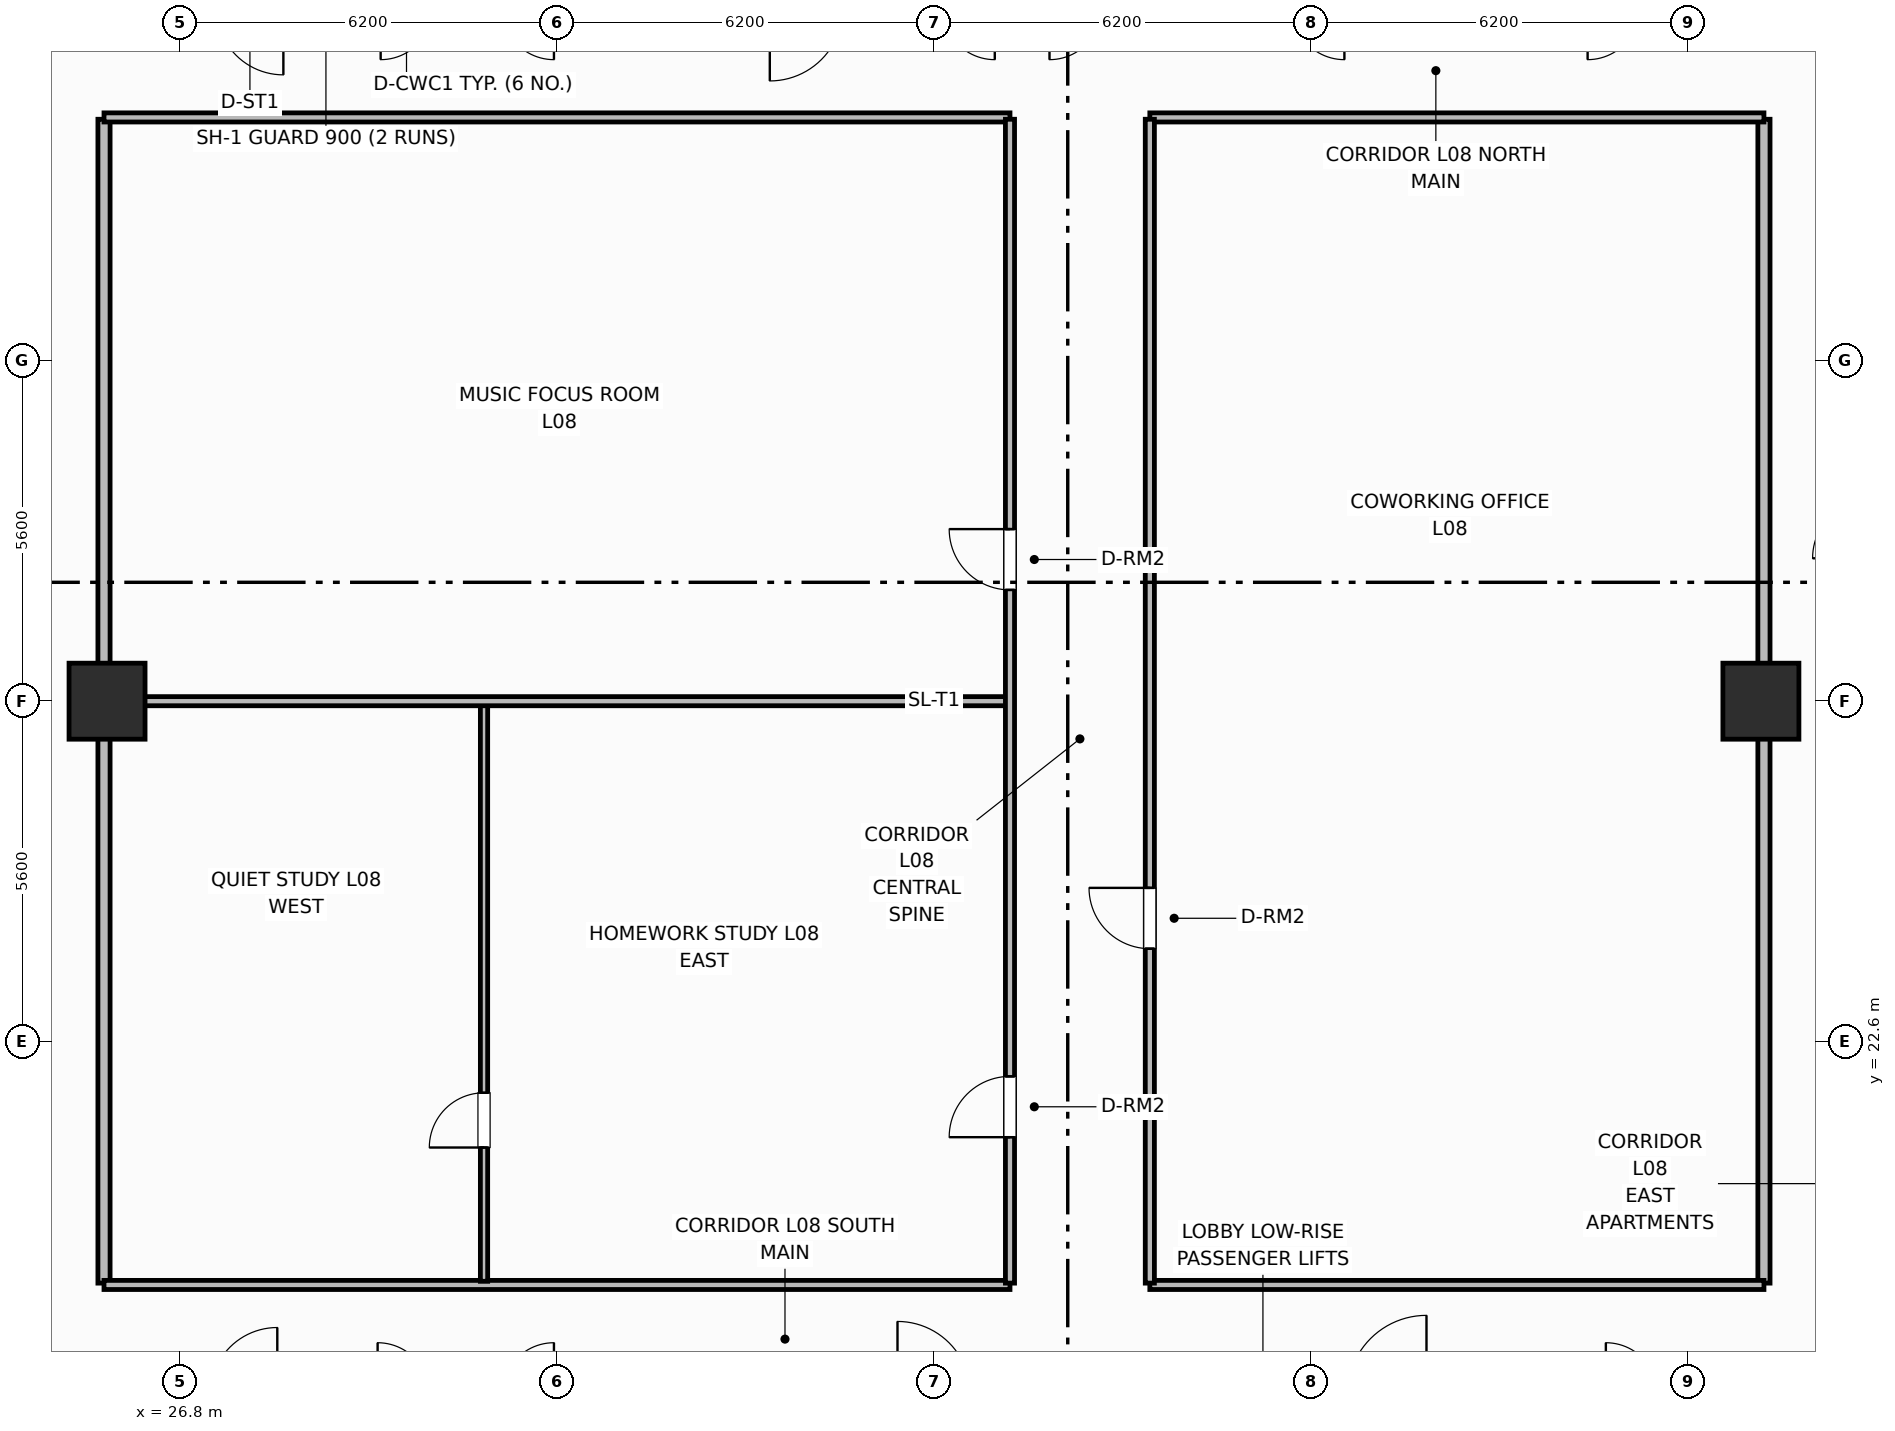
"""IFC4 building model, lengths in metres.
Left out: names, types, materials, properties, quantities, classifications, styles, units other than length and angle.
Written with IfcOpenShell. Run it as: python <this file> out.ifc"""

import sys

from ifc_helpers import new_model, si_unit, direction, frame, frame_2d, origin, origin_2d, place, context, subcontext, project, spatial, rectangle, extrude, element, fill, save


model = new_model("IFC4")
c1 = context("Model", 3, precision=1e-05, world=origin(), true_north=direction((0.0, 1.0)))
c2 = subcontext(c1, "Body", "Model", "MODEL_VIEW")
j1 = project(units=[si_unit("LENGTHUNIT", "METRE"), si_unit("PLANEANGLEUNIT", "RADIAN")], contexts=[c1])
p1 = place(None, origin())
s1 = spatial("IfcSite", under=j1, at=p1, CompositionType="ELEMENT")
p2 = place(p1, origin())
s2 = spatial("IfcBuilding", under=s1, at=p2, CompositionType="ELEMENT")
p3 = place(p2, frame((0.0, 0.0, 36.2)))
s3 = spatial("IfcBuildingStorey", under=s2, at=p3, CompositionType="ELEMENT", Elevation=36.2)
for number, where, z_axis, x_axis in (
    (1, (25.6, 28.2, 0.0), (0.0, 0.0, 1.0), (1.0, 0.0, 0.0)),
    (2, (52.8, 28.2, 0.0), (0.0, 0.0, 1.0), (1.0, 0.0, 0.0)),
):
    element("IfcColumn", number, at=place(p3, frame(where, z_axis=z_axis, x_axis=x_axis)), inside=s3, PredefinedType="COLUMN", context=c2, shape_type="SweptSolid", body=[
        extrude(rectangle(XDim=1.25, YDim=1.25, at=origin_2d()), origin(), (0.0, 0.0, 1.0), 3.7),
    ])
for number, where, z_axis, x_axis in (
    (3, (25.55, 18.63, 0.0), (0.0, 0.0, 1.0), (0.0, 1.0, 0.0)),
    (4, (52.85, 18.63, 0.0), (0.0, 0.0, 1.0), (0.0, 1.0, 0.0)),
):
    element("IfcWall", number, at=place(p3, frame(where, z_axis=z_axis, x_axis=x_axis)), inside=s3, PredefinedType="PARTITIONING", context=c2, shape_type="SweptSolid", body=[
        extrude(rectangle(XDim=19.14, YDim=0.2, at=frame_2d((9.57, 0.0))), origin(), (0.0, 0.0, 1.0), 2.53),
    ])
p4 = place(p3, frame((25.55, 18.6, 0.0), z_axis=(0.0, 0.0, 1.0), x_axis=(1.0, 0.0, 0.0)))
e5 = element("IfcWall", 5, at=p4, inside=s3, PredefinedType="PARTITIONING", context=c2, shape_type="SweptSolid", body=[
    extrude(rectangle(XDim=14.9, YDim=0.15, at=frame_2d((7.45, 0.0))), origin(), (0.0, 0.0, 1.0), 2.53),
])
p5 = place(p3, frame((42.75, 18.6, 0.0), z_axis=(0.0, 0.0, 1.0), x_axis=(1.0, 0.0, 0.0)))
e6 = element("IfcWall", 6, at=p5, inside=s3, PredefinedType="PARTITIONING", context=c2, shape_type="SweptSolid", body=[
    extrude(rectangle(XDim=10.1, YDim=0.15, at=frame_2d((5.05, 0.0))), origin(), (0.0, 0.0, 1.0), 2.53),
])
p6 = place(p3, frame((25.55, 37.8, 0.0), z_axis=(0.0, 0.0, 1.0), x_axis=(1.0, 0.0, 0.0)))
e7 = element("IfcWall", 7, at=p6, inside=s3, PredefinedType="PARTITIONING", context=c2, shape_type="SweptSolid", body=[
    extrude(rectangle(XDim=14.9, YDim=0.15, at=frame_2d((7.45, 0.0))), origin(), (0.0, 0.0, 1.0), 2.53),
])
p7 = place(p3, frame((42.75, 37.8, 0.0), z_axis=(0.0, 0.0, 1.0), x_axis=(1.0, 0.0, 0.0)))
e8 = element("IfcWall", 8, at=p7, inside=s3, PredefinedType="PARTITIONING", context=c2, shape_type="SweptSolid", body=[
    extrude(rectangle(XDim=10.1, YDim=0.15, at=frame_2d((5.05, 0.0))), origin(), (0.0, 0.0, 1.0), 2.53),
])
p8 = place(p3, frame((31.8, 18.66, 0.0), z_axis=(0.0, 0.0, 1.0), x_axis=(0.0, 1.0, 0.0)))
e9 = element("IfcWall", 9, at=p8, inside=s3, PredefinedType="PARTITIONING", context=c2, shape_type="SweptSolid", body=[
    extrude(rectangle(XDim=9.49, YDim=0.12, at=frame_2d((4.745, 0.0))), origin(), (0.0, 0.0, 1.0), 2.53),
])
p9 = place(p8, frame((2.2, 0.0, 0.0)))
e10 = element("IfcOpeningElement", 10, at=p9, cuts=e9, PredefinedType="OPENING", context=c2, shape_type="SweptSolid", body=[
    extrude(rectangle(XDim=0.9, YDim=2.1, at=frame_2d((0.45, 1.05))), frame((0.0, 0.07, 0.0), z_axis=(0.0, -1.0, 0.0), x_axis=(1.0, 0.0, 0.0)), (0.0, 0.0, 1.0), 0.14),
])
p10 = place(p3, frame((25.6, 28.2, 0.0), z_axis=(0.0, 0.0, 1.0), x_axis=(1.0, 0.0, 0.0)))
e11 = element("IfcWall", 11, at=p10, inside=s3, PredefinedType="PARTITIONING", context=c2, shape_type="SweptSolid", body=[
    extrude(rectangle(XDim=14.87, YDim=0.15, at=frame_2d((7.435, 0.0))), origin(), (0.0, 0.0, 1.0), 2.53),
])
p11 = place(p3, frame((40.45, 18.63, 0.0), z_axis=(0.0, 0.0, 1.0), x_axis=(0.0, 1.0, 0.0)))
e12 = element("IfcWall", 12, at=p11, inside=s3, PredefinedType="PARTITIONING", context=c2, shape_type="SweptSolid", body=[
    extrude(rectangle(XDim=19.14, YDim=0.15, at=frame_2d((9.57, 0.0))), origin(), (0.0, 0.0, 1.0), 2.53),
])
p12 = place(p11, frame((2.4, 0.0, 0.0)))
e13 = element("IfcOpeningElement", 13, at=p12, cuts=e12, PredefinedType="OPENING", context=c2, shape_type="SweptSolid", body=[
    extrude(rectangle(XDim=1.0, YDim=2.15, at=frame_2d((0.5, 1.075))), frame((0.0, 0.085, 0.0), z_axis=(0.0, -1.0, 0.0), x_axis=(1.0, 0.0, 0.0)), (0.0, 0.0, 1.0), 0.17),
])
p13 = place(p11, frame((11.4, 0.0, 0.0)))
e14 = element("IfcOpeningElement", 14, at=p13, cuts=e12, PredefinedType="OPENING", context=c2, shape_type="SweptSolid", body=[
    extrude(rectangle(XDim=1.0, YDim=2.15, at=frame_2d((0.5, 1.075))), frame((0.0, 0.085, 0.0), z_axis=(0.0, -1.0, 0.0), x_axis=(1.0, 0.0, 0.0)), (0.0, 0.0, 1.0), 0.17),
])
p14 = place(p3, frame((42.75, 18.63, 0.0), z_axis=(0.0, 0.0, 1.0), x_axis=(0.0, 1.0, 0.0)))
e15 = element("IfcWall", 15, at=p14, inside=s3, PredefinedType="PARTITIONING", context=c2, shape_type="SweptSolid", body=[
    extrude(rectangle(XDim=19.14, YDim=0.15, at=frame_2d((9.57, 0.0))), origin(), (0.0, 0.0, 1.0), 2.53),
])
p15 = place(p14, frame((5.5, 0.0, 0.0)))
e16 = element("IfcOpeningElement", 16, at=p15, cuts=e15, PredefinedType="OPENING", context=c2, shape_type="SweptSolid", body=[
    extrude(rectangle(XDim=1.0, YDim=2.15, at=frame_2d((0.5, 1.075))), frame((0.0, 0.085, 0.0), z_axis=(0.0, -1.0, 0.0), x_axis=(1.0, 0.0, 0.0)), (0.0, 0.0, 1.0), 0.17),
])
p16 = place(p9, origin())
e17 = element("IfcDoor", 17, at=p16, inside=s3, OperationType="SINGLE_SWING_LEFT", PredefinedType="DOOR", context=c2, shape_type="SweptSolid", body=[
    extrude(rectangle(XDim=0.9, YDim=2.1, at=frame_2d((0.45, 1.05))), frame((0.0, 0.025, 0.0), z_axis=(0.0, -1.0, 0.0), x_axis=(1.0, 0.0, 0.0)), (0.0, 0.0, 1.0), 0.05),
])
fill(e10, e17)
p17 = place(p12, origin())
e18 = element("IfcDoor", 18, at=p17, inside=s3, OperationType="SINGLE_SWING_LEFT", PredefinedType="DOOR", context=c2, shape_type="SweptSolid", body=[
    extrude(rectangle(XDim=1.0, YDim=2.15, at=frame_2d((0.5, 1.075))), frame((0.0, 0.025, 0.0), z_axis=(0.0, -1.0, 0.0), x_axis=(1.0, 0.0, 0.0)), (0.0, 0.0, 1.0), 0.05),
])
fill(e13, e18)
p18 = place(p13, origin())
e19 = element("IfcDoor", 19, at=p18, inside=s3, OperationType="SINGLE_SWING_RIGHT", PredefinedType="DOOR", context=c2, shape_type="SweptSolid", body=[
    extrude(rectangle(XDim=1.0, YDim=2.15, at=frame_2d((0.5, 1.075))), frame((0.0, 0.025, 0.0), z_axis=(0.0, -1.0, 0.0), x_axis=(1.0, 0.0, 0.0)), (0.0, 0.0, 1.0), 0.05),
])
fill(e14, e19)
p19 = place(p15, origin())
e20 = element("IfcDoor", 20, at=p19, inside=s3, OperationType="SINGLE_SWING_RIGHT", PredefinedType="DOOR", context=c2, shape_type="SweptSolid", body=[
    extrude(rectangle(XDim=1.0, YDim=2.15, at=frame_2d((0.5, 1.075))), frame((0.0, 0.025, 0.0), z_axis=(0.0, -1.0, 0.0), x_axis=(1.0, 0.0, 0.0)), (0.0, 0.0, 1.0), 0.05),
])
fill(e16, e20)
save(model, sys.argv[1])
